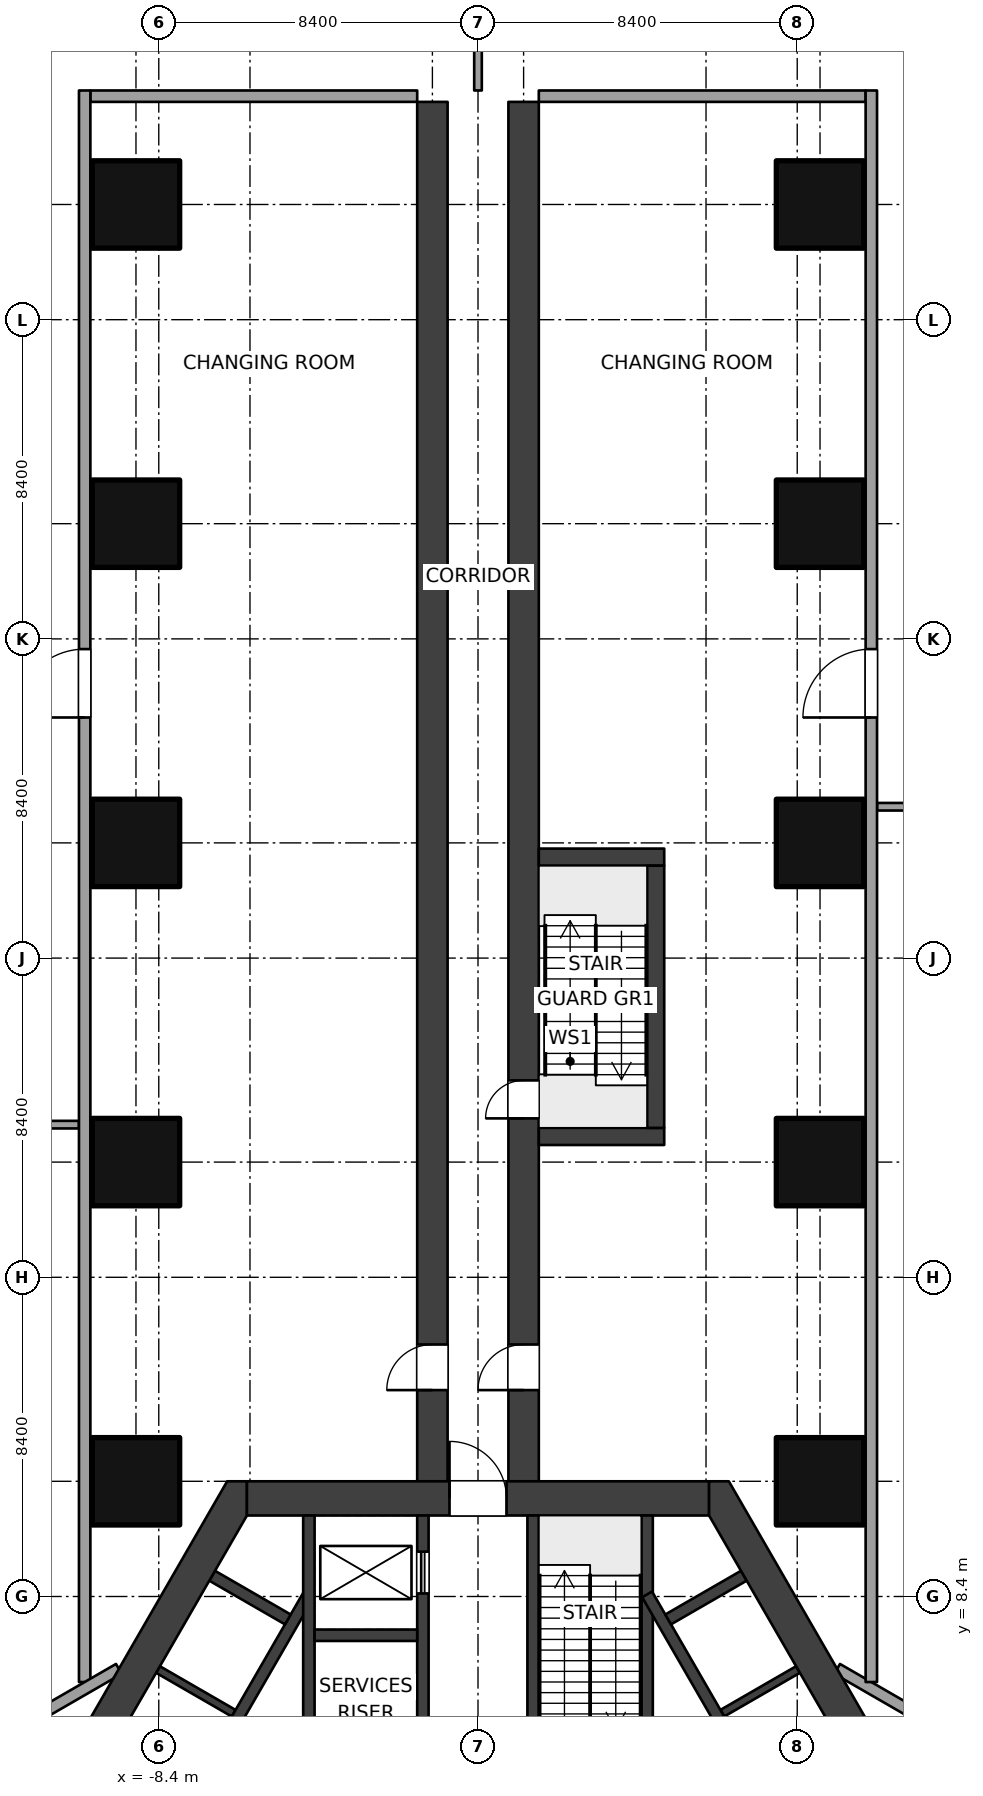
"""IFC4 building model, lengths in metres.
Left out: names, types, materials, properties, quantities, classifications, styles, units other than length and angle.
Written with IfcOpenShell. Run it as: python <this file> out.ifc"""

import sys

from ifc_helpers import new_model, si_unit, direction, frame, frame_2d, origin, origin_2d, place, context, subcontext, project, spatial, polyline, rectangle, outline, extrude, element, fill, save


model = new_model("IFC4")
c1 = context("Model", 3, precision=1e-05, world=origin(), true_north=direction((0.0, 1.0)))
c2 = subcontext(c1, "Body", "Model", "MODEL_VIEW")
j1 = project(units=[si_unit("LENGTHUNIT", "METRE"), si_unit("PLANEANGLEUNIT", "RADIAN")], contexts=[c1])
p1 = place(None, origin())
s1 = spatial("IfcSite", under=j1, at=p1, CompositionType="ELEMENT")
p2 = place(p1, origin())
s2 = spatial("IfcBuilding", under=s1, at=p2, CompositionType="ELEMENT")
p3 = place(p2, frame((0.0, 0.0, 11.0)))
s3 = spatial("IfcBuildingStorey", under=s2, at=p3, CompositionType="ELEMENT", Elevation=11.0)
for number, where, z_axis, x_axis in (
    (1, (-9.0, 11.432, 0.0), (0.0, 0.0, 1.0), (1.0, 0.0, 0.0)),
    (2, (9.0, 11.432, 0.0), (0.0, 0.0, 1.0), (1.0, 0.0, 0.0)),
    (3, (-9.0, 19.832, 0.0), (0.0, 0.0, 1.0), (1.0, 0.0, 0.0)),
    (4, (9.0, 19.832, 0.0), (0.0, 0.0, 1.0), (1.0, 0.0, 0.0)),
    (5, (-9.0, 28.231, 0.0), (0.0, 0.0, 1.0), (1.0, 0.0, 0.0)),
    (6, (9.0, 28.231, 0.0), (0.0, 0.0, 1.0), (1.0, 0.0, 0.0)),
    (7, (-9.0, 36.632, 0.0), (0.0, 0.0, 1.0), (1.0, 0.0, 0.0)),
    (8, (9.0, 36.632, 0.0), (0.0, 0.0, 1.0), (1.0, 0.0, 0.0)),
    (9, (-9.0, 45.031, 0.0), (0.0, 0.0, 1.0), (1.0, 0.0, 0.0)),
    (10, (9.0, 45.031, 0.0), (0.0, 0.0, 1.0), (1.0, 0.0, 0.0)),
):
    element("IfcColumn", number, at=place(p3, frame(where, z_axis=z_axis, x_axis=x_axis)), inside=s3, PredefinedType="COLUMN", context=c2, shape_type="SweptSolid", body=[
        extrude(rectangle(XDim=2.3, YDim=2.3, at=origin_2d()), origin(), (0.0, 0.0, 1.0), 5.0),
    ])
p4 = place(p3, frame((-6.08, 10.981, 0.0), z_axis=(0.0, 0.0, 1.0), x_axis=(1.0, 0.0, 0.0)))
e11 = element("IfcWall", 11, at=p4, inside=s3, PredefinedType="SHEAR", context=c2, shape_type="SweptSolid", body=[
    extrude(rectangle(XDim=12.161, YDim=0.9, at=frame_2d((6.08, 0.0))), origin(), (0.0, 0.0, 1.0), 5.0),
])
p5 = place(p4, frame((5.33, 0.0, 0.0)))
e12 = element("IfcOpeningElement", 12, at=p5, cuts=e11, PredefinedType="OPENING", context=c2, shape_type="SweptSolid", body=[
    extrude(rectangle(XDim=1.5, YDim=2.1, at=frame_2d((0.75, 1.05))), frame((0.0, 0.46, 0.0), z_axis=(0.0, -1.0, 0.0), x_axis=(1.0, 0.0, 0.0)), (0.0, 0.0, 1.0), 0.92),
])
p6 = place(p3, origin())
e13 = element("IfcWall", 13, at=p6, inside=s3, PredefinedType="SHEAR", context=c2, shape_type="SweptSolid", body=[
    extrude(outline(polyline([(13.2, 0.0), (6.6, 11.432), (6.08, 11.432), (6.08, 10.531), (12.161, 0.0), (12.94, -0.45), (13.2, 0.0)])), origin(), (0.0, 0.0, 1.0), 5.0),
])
p7 = place(p3, origin())
e14 = element("IfcWall", 14, at=p7, inside=s3, PredefinedType="SHEAR", context=c2, shape_type="SweptSolid", body=[
    extrude(outline(polyline([(-6.6, 11.432), (-13.2, 0.0), (-12.94, -0.45), (-12.161, 0.0), (-6.08, 10.531), (-6.08, 11.432), (-6.6, 11.432)])), origin(), (0.0, 0.0, 1.0), 5.0),
])
p8 = place(p3, frame((1.45, 3.63, 0.0), z_axis=(0.0, 0.0, 1.0), x_axis=(0.0, 1.0, 0.0)))
e15 = element("IfcWall", 15, at=p8, inside=s3, PredefinedType="SHEAR", context=c2, shape_type="SweptSolid", body=[
    extrude(rectangle(XDim=6.902, YDim=0.3, at=frame_2d((3.451, 0.0))), origin(), (0.0, 0.0, 1.0), 5.0),
])
p9 = place(p8, frame((0.25, 0.0, 0.0)))
e16 = element("IfcOpeningElement", 16, at=p9, cuts=e15, PredefinedType="OPENING", context=c2, shape_type="SweptSolid", body=[
    extrude(rectangle(XDim=1.0, YDim=2.1, at=frame_2d((0.5, 1.05))), frame((0.0, 0.16, 0.0), z_axis=(0.0, -1.0, 0.0), x_axis=(1.0, 0.0, 0.0)), (0.0, 0.0, 1.0), 0.32),
])
p10 = place(p3, frame((4.45, 3.63, 0.0), z_axis=(0.0, 0.0, 1.0), x_axis=(0.0, 1.0, 0.0)))
e17 = element("IfcWall", 17, at=p10, inside=s3, PredefinedType="SHEAR", context=c2, shape_type="SweptSolid", body=[
    extrude(rectangle(XDim=6.902, YDim=0.3, at=frame_2d((3.451, 0.0))), origin(), (0.0, 0.0, 1.0), 5.0),
])
p11 = place(p3, frame((-1.45, 3.63, 0.0), z_axis=(0.0, 0.0, 1.0), x_axis=(0.0, 1.0, 0.0)))
e18 = element("IfcWall", 18, at=p11, inside=s3, PredefinedType="SHEAR", context=c2, shape_type="SweptSolid", body=[
    extrude(rectangle(XDim=6.902, YDim=0.3, at=frame_2d((3.451, 0.0))), origin(), (0.0, 0.0, 1.0), 5.0),
])
p12 = place(p11, frame((4.85, 0.0, 0.0)))
e19 = element("IfcOpeningElement", 19, at=p12, cuts=e18, PredefinedType="OPENING", context=c2, shape_type="SweptSolid", body=[
    extrude(rectangle(XDim=1.1, YDim=2.1, at=frame_2d((0.55, 1.05))), frame((0.0, 0.16, 0.0), z_axis=(0.0, -1.0, 0.0), x_axis=(1.0, 0.0, 0.0)), (0.0, 0.0, 1.0), 0.32),
])
p13 = place(p3, frame((-4.45, 3.63, 0.0), z_axis=(0.0, 0.0, 1.0), x_axis=(0.0, 1.0, 0.0)))
e20 = element("IfcWall", 20, at=p13, inside=s3, PredefinedType="SHEAR", context=c2, shape_type="SweptSolid", body=[
    extrude(rectangle(XDim=6.902, YDim=0.3, at=frame_2d((3.451, 0.0))), origin(), (0.0, 0.0, 1.0), 5.0),
])
p14 = place(p3, frame((-4.3, 7.38, 0.0), z_axis=(0.0, 0.0, 1.0), x_axis=(1.0, 0.0, 0.0)))
e21 = element("IfcWall", 21, at=p14, inside=s3, PredefinedType="SHEAR", context=c2, shape_type="SweptSolid", body=[
    extrude(rectangle(XDim=2.7, YDim=0.3, at=frame_2d((1.35, 0.0))), origin(), (0.0, 0.0, 1.0), 5.0),
])
p15 = place(p3, frame((4.45, 8.455, 0.0), z_axis=(0.0, 0.0, 1.0), x_axis=(0.500002290144, -0.866024081565, 0.0)))
e22 = element("IfcWall", 22, at=p15, inside=s3, PredefinedType="SHEAR", context=c2, shape_type="SweptSolid", body=[
    extrude(rectangle(XDim=10.195, YDim=0.3, at=frame_2d((5.098, 0.0))), origin(), (0.0, 0.0, 1.0), 5.0),
])
p16 = place(p3, frame((5.004, 7.796, 0.0), z_axis=(0.0, 0.0, 1.0), x_axis=(0.866053019151, 0.499952165731, 0.0)))
e23 = element("IfcWall", 23, at=p16, inside=s3, PredefinedType="SHEAR", context=c2, shape_type="SweptSolid", body=[
    extrude(rectangle(XDim=2.3, YDim=0.3, at=frame_2d((1.15, 0.0))), origin(), (0.0, 0.0, 1.0), 5.0),
])
p17 = place(p3, frame((6.429, 5.328, 0.0), z_axis=(0.0, 0.0, 1.0), x_axis=(0.866007057882, 0.500031774688, 0.0)))
e24 = element("IfcWall", 24, at=p17, inside=s3, PredefinedType="SHEAR", context=c2, shape_type="SweptSolid", body=[
    extrude(rectangle(XDim=2.3, YDim=0.2, at=frame_2d((1.15, 0.0))), origin(), (0.0, 0.0, 1.0), 5.0),
])
p18 = place(p3, frame((-9.548, -0.374, 0.0), z_axis=(0.0, 0.0, 1.0), x_axis=(0.500002290144, 0.866024081565, 0.0)))
e25 = element("IfcWall", 25, at=p18, inside=s3, PredefinedType="SHEAR", context=c2, shape_type="SweptSolid", body=[
    extrude(rectangle(XDim=10.195, YDim=0.3, at=frame_2d((5.098, 0.0))), origin(), (0.0, 0.0, 1.0), 5.0),
])
p19 = place(p3, frame((-5.004, 7.796, 0.0), z_axis=(0.0, 0.0, 1.0), x_axis=(-0.866053019151, 0.499952165731, 0.0)))
e26 = element("IfcWall", 26, at=p19, inside=s3, PredefinedType="SHEAR", context=c2, shape_type="SweptSolid", body=[
    extrude(rectangle(XDim=2.3, YDim=0.3, at=frame_2d((1.15, 0.0))), origin(), (0.0, 0.0, 1.0), 5.0),
])
p20 = place(p3, frame((-6.429, 5.328, 0.0), z_axis=(0.0, 0.0, 1.0), x_axis=(-0.866007057882, 0.500031774688, 0.0)))
e27 = element("IfcWall", 27, at=p20, inside=s3, PredefinedType="SHEAR", context=c2, shape_type="SweptSolid", body=[
    extrude(rectangle(XDim=2.3, YDim=0.2, at=frame_2d((1.15, 0.0))), origin(), (0.0, 0.0, 1.0), 5.0),
])
p21 = place(p3, frame((-1.2, 10.981, 0.0), z_axis=(0.0, 0.0, 1.0), x_axis=(0.0, 1.0, 0.0)))
e28 = element("IfcWall", 28, at=p21, inside=s3, PredefinedType="SHEAR", context=c2, shape_type="SweptSolid", body=[
    extrude(rectangle(XDim=36.75, YDim=0.8, at=frame_2d((18.375, 0.0))), origin(), (0.0, 0.0, 1.0), 5.0),
])
p22 = place(p21, frame((2.85, 0.0, 0.0)))
e29 = element("IfcOpeningElement", 29, at=p22, cuts=e28, PredefinedType="OPENING", context=c2, shape_type="SweptSolid", body=[
    extrude(rectangle(XDim=1.2, YDim=2.1, at=frame_2d((0.6, 1.05))), frame((0.0, 0.41, 0.0), z_axis=(0.0, -1.0, 0.0), x_axis=(1.0, 0.0, 0.0)), (0.0, 0.0, 1.0), 0.82),
])
p23 = place(p3, frame((1.2, 10.981, 0.0), z_axis=(0.0, 0.0, 1.0), x_axis=(0.0, 1.0, 0.0)))
e30 = element("IfcWall", 30, at=p23, inside=s3, PredefinedType="SHEAR", context=c2, shape_type="SweptSolid", body=[
    extrude(rectangle(XDim=36.75, YDim=0.8, at=frame_2d((18.375, 0.0))), origin(), (0.0, 0.0, 1.0), 5.0),
])
p24 = place(p23, frame((10.0, 0.0, 0.0)))
e31 = element("IfcOpeningElement", 31, at=p24, cuts=e30, PredefinedType="OPENING", context=c2, shape_type="SweptSolid", body=[
    extrude(rectangle(XDim=1.0, YDim=2.1, at=frame_2d((0.5, 1.05))), frame((0.0, 0.41, 0.0), z_axis=(0.0, -1.0, 0.0), x_axis=(1.0, 0.0, 0.0)), (0.0, 0.0, 1.0), 0.82),
])
p25 = place(p23, frame((2.85, 0.0, 0.0)))
e32 = element("IfcOpeningElement", 32, at=p25, cuts=e30, PredefinedType="OPENING", context=c2, shape_type="SweptSolid", body=[
    extrude(rectangle(XDim=1.2, YDim=2.1, at=frame_2d((0.6, 1.05))), frame((0.0, 0.41, 0.0), z_axis=(0.0, -1.0, 0.0), x_axis=(1.0, 0.0, 0.0)), (0.0, 0.0, 1.0), 0.82),
])
p26 = place(p3, frame((0.0, 48.031, 0.0), z_axis=(0.0, 0.0, 1.0), x_axis=(0.0, 1.0, 0.0)))
e33 = element("IfcWall", 33, at=p26, inside=s3, PredefinedType="SOLIDWALL", context=c2, shape_type="SweptSolid", body=[
    extrude(rectangle(XDim=2.176, YDim=0.2, at=frame_2d((1.088, 0.0))), origin(), (0.0, 0.0, 1.0), 4.7),
])
p27 = place(p3, frame((10.5, 29.183, 0.0), z_axis=(0.0, 0.0, 1.0), x_axis=(1.0, 0.0, 0.0)))
e34 = element("IfcWall", 34, at=p27, inside=s3, PredefinedType="SOLIDWALL", context=c2, shape_type="SweptSolid", body=[
    extrude(rectangle(XDim=39.737, YDim=0.2, at=frame_2d((19.869, 0.0))), origin(), (0.0, 0.0, 1.0), 4.7),
])
p28 = place(p27, frame((18.0, 0.0, 0.0)))
e35 = element("IfcOpeningElement", 35, at=p28, cuts=e34, PredefinedType="OPENING", context=c2, shape_type="SweptSolid", body=[
    extrude(rectangle(XDim=1.8, YDim=2.4, at=frame_2d((0.9, 1.2))), frame((0.0, 0.11, 0.0), z_axis=(0.0, -1.0, 0.0), x_axis=(1.0, 0.0, 0.0)), (0.0, 0.0, 1.0), 0.22),
])
p29 = place(p3, frame((-50.237, 20.817, 0.0), z_axis=(0.0, 0.0, 1.0), x_axis=(1.0, 0.0, 0.0)))
e36 = element("IfcWall", 36, at=p29, inside=s3, PredefinedType="SOLIDWALL", context=c2, shape_type="SweptSolid", body=[
    extrude(rectangle(XDim=39.737, YDim=0.2, at=frame_2d((19.869, 0.0))), origin(), (0.0, 0.0, 1.0), 4.7),
])
p30 = place(p29, frame((19.937, 0.0, 0.0)))
e37 = element("IfcOpeningElement", 37, at=p30, cuts=e36, PredefinedType="OPENING", context=c2, shape_type="SweptSolid", body=[
    extrude(rectangle(XDim=1.8, YDim=2.4, at=frame_2d((0.9, 1.2))), frame((0.0, 0.11, 0.0), z_axis=(0.0, -1.0, 0.0), x_axis=(1.0, 0.0, 0.0)), (0.0, 0.0, 1.0), 0.22),
])
for number, where, z_axis, x_axis in (
    (38, (-1.6, 47.882, 0.0), (0.0, 0.0, 1.0), (-1.0, 0.0, 0.0)),
    (39, (1.6, 47.882, 0.0), (0.0, 0.0, 1.0), (1.0, 0.0, 0.0)),
):
    element("IfcWall", number, at=place(p3, frame(where, z_axis=z_axis, x_axis=x_axis)), inside=s3, PredefinedType="SOLIDWALL", context=c2, shape_type="SweptSolid", body=[
        extrude(rectangle(XDim=8.6, YDim=0.3, at=frame_2d((4.3, 0.0))), origin(), (0.0, 0.0, 1.0), 3.1),
    ])
p31 = place(p3, frame((-10.35, 6.149, 0.0), z_axis=(0.0, 0.0, 1.0), x_axis=(0.0, 1.0, 0.0)))
e40 = element("IfcWall", 40, at=p31, inside=s3, PredefinedType="SOLIDWALL", context=c2, shape_type="SweptSolid", body=[
    extrude(rectangle(XDim=41.883, YDim=0.3, at=frame_2d((20.941, 0.0))), origin(), (0.0, 0.0, 1.0), 4.7),
])
p32 = place(p31, frame((25.383, 0.0, 0.0)))
e41 = element("IfcOpeningElement", 41, at=p32, cuts=e40, PredefinedType="OPENING", context=c2, shape_type="SweptSolid", body=[
    extrude(rectangle(XDim=1.8, YDim=2.4, at=frame_2d((0.9, 1.2))), frame((0.0, 0.16, 0.0), z_axis=(0.0, -1.0, 0.0), x_axis=(1.0, 0.0, 0.0)), (0.0, 0.0, 1.0), 0.32),
])
p33 = place(p3, frame((10.35, 6.149, 0.0), z_axis=(0.0, 0.0, 1.0), x_axis=(0.0, 1.0, 0.0)))
e42 = element("IfcWall", 42, at=p33, inside=s3, PredefinedType="SOLIDWALL", context=c2, shape_type="SweptSolid", body=[
    extrude(rectangle(XDim=41.883, YDim=0.3, at=frame_2d((20.941, 0.0))), origin(), (0.0, 0.0, 1.0), 4.7),
])
p34 = place(p33, frame((25.383, 0.0, 0.0)))
e43 = element("IfcOpeningElement", 43, at=p34, cuts=e42, PredefinedType="OPENING", context=c2, shape_type="SweptSolid", body=[
    extrude(rectangle(XDim=1.8, YDim=2.4, at=frame_2d((0.9, 1.2))), frame((0.0, 0.16, 0.0), z_axis=(0.0, -1.0, 0.0), x_axis=(1.0, 0.0, 0.0)), (0.0, 0.0, 1.0), 0.32),
])
p35 = place(p3, frame((-9.45, 6.495, 0.0), z_axis=(0.0, 0.0, 1.0), x_axis=(-0.866025301493, -0.500000177174, 0.0)))
e44 = element("IfcWall", 44, at=p35, inside=s3, PredefinedType="SOLIDWALL", context=c2, shape_type="SweptSolid", body=[
    extrude(rectangle(XDim=43.095, YDim=0.3, at=frame_2d((21.548, 0.0))), origin(), (0.0, 0.0, 1.0), 4.7),
])
p36 = place(p35, frame((26.595, 0.0, 0.0)))
e45 = element("IfcOpeningElement", 45, at=p36, cuts=e44, PredefinedType="OPENING", context=c2, shape_type="SweptSolid", body=[
    extrude(rectangle(XDim=1.8, YDim=2.4, at=frame_2d((0.9, 1.2))), frame((0.0, 0.16, 0.0), z_axis=(0.0, -1.0, 0.0), x_axis=(1.0, 0.0, 0.0)), (0.0, 0.0, 1.0), 0.32),
])
p37 = place(p3, frame((9.45, 6.495, 0.0), z_axis=(0.0, 0.0, 1.0), x_axis=(0.866025301493, -0.500000177174, 0.0)))
e46 = element("IfcWall", 46, at=p37, inside=s3, PredefinedType="SOLIDWALL", context=c2, shape_type="SweptSolid", body=[
    extrude(rectangle(XDim=43.095, YDim=0.3, at=frame_2d((21.548, 0.0))), origin(), (0.0, 0.0, 1.0), 4.7),
])
p38 = place(p37, frame((26.595, 0.0, 0.0)))
e47 = element("IfcOpeningElement", 47, at=p38, cuts=e46, PredefinedType="OPENING", context=c2, shape_type="SweptSolid", body=[
    extrude(rectangle(XDim=1.8, YDim=2.4, at=frame_2d((0.9, 1.2))), frame((0.0, 0.16, 0.0), z_axis=(0.0, -1.0, 0.0), x_axis=(1.0, 0.0, 0.0)), (0.0, 0.0, 1.0), 0.32),
])
for number, where, z_axis, x_axis in (
    (48, (1.6, 20.507, 0.0), (0.0, 0.0, 1.0), (1.0, 0.0, 0.0)),
    (49, (1.6, 27.856, 0.0), (0.0, 0.0, 1.0), (1.0, 0.0, 0.0)),
):
    element("IfcWall", number, at=place(p3, frame(where, z_axis=z_axis, x_axis=x_axis)), inside=s3, PredefinedType="SOLIDWALL", context=c2, shape_type="SweptSolid", body=[
        extrude(rectangle(XDim=3.3, YDim=0.45, at=frame_2d((1.65, 0.0))), origin(), (0.0, 0.0, 1.0), 5.0),
    ])
p39 = place(p3, frame((4.675, 20.731, 0.0), z_axis=(0.0, 0.0, 1.0), x_axis=(0.0, 1.0, 0.0)))
e50 = element("IfcWall", 50, at=p39, inside=s3, PredefinedType="SOLIDWALL", context=c2, shape_type="SweptSolid", body=[
    extrude(rectangle(XDim=6.9, YDim=0.45, at=frame_2d((3.45, 0.0))), origin(), (0.0, 0.0, 1.0), 5.0),
])
p40 = place(p12, origin())
e51 = element("IfcDoor", 51, at=p40, inside=s3, OperationType="DOUBLE_DOOR_SLIDING", PredefinedType="DOOR", context=c2, shape_type="SweptSolid", body=[
    extrude(rectangle(XDim=1.1, YDim=2.1, at=frame_2d((0.55, 1.05))), frame((0.0, 0.025, 0.0), z_axis=(0.0, -1.0, 0.0), x_axis=(1.0, 0.0, 0.0)), (0.0, 0.0, 1.0), 0.05),
])
fill(e19, e51)
p41 = place(p5, origin())
e52 = element("IfcDoor", 52, at=p41, inside=s3, OperationType="DOUBLE_DOOR_DOUBLE_SWING", PredefinedType="DOOR", context=c2, shape_type="SweptSolid", body=[
    extrude(rectangle(XDim=1.5, YDim=2.1, at=frame_2d((0.75, 1.05))), frame((0.0, 0.025, 0.0), z_axis=(0.0, -1.0, 0.0), x_axis=(1.0, 0.0, 0.0)), (0.0, 0.0, 1.0), 0.05),
])
fill(e12, e52)
p42 = place(p24, origin())
e53 = element("IfcDoor", 53, at=p42, inside=s3, OperationType="SINGLE_SWING_LEFT", PredefinedType="DOOR", context=c2, shape_type="SweptSolid", body=[
    extrude(rectangle(XDim=1.0, YDim=2.1, at=frame_2d((0.5, 1.05))), frame((0.0, 0.025, 0.0), z_axis=(0.0, -1.0, 0.0), x_axis=(1.0, 0.0, 0.0)), (0.0, 0.0, 1.0), 0.05),
])
fill(e31, e53)
p43 = place(p22, origin())
e54 = element("IfcDoor", 54, at=p43, inside=s3, OperationType="DOUBLE_SWING_LEFT", PredefinedType="DOOR", context=c2, shape_type="SweptSolid", body=[
    extrude(rectangle(XDim=1.2, YDim=2.1, at=frame_2d((0.6, 1.05))), frame((0.0, 0.025, 0.0), z_axis=(0.0, -1.0, 0.0), x_axis=(1.0, 0.0, 0.0)), (0.0, 0.0, 1.0), 0.05),
])
fill(e29, e54)
p44 = place(p25, origin())
e55 = element("IfcDoor", 55, at=p44, inside=s3, OperationType="DOUBLE_SWING_LEFT", PredefinedType="DOOR", context=c2, shape_type="SweptSolid", body=[
    extrude(rectangle(XDim=1.2, YDim=2.1, at=frame_2d((0.6, 1.05))), frame((0.0, 0.025, 0.0), z_axis=(0.0, -1.0, 0.0), x_axis=(1.0, 0.0, 0.0)), (0.0, 0.0, 1.0), 0.05),
])
fill(e32, e55)
p45 = place(p32, origin())
e56 = element("IfcDoor", 56, at=p45, inside=s3, OperationType="DOUBLE_DOOR_DOUBLE_SWING", PredefinedType="DOOR", context=c2, shape_type="SweptSolid", body=[
    extrude(rectangle(XDim=1.8, YDim=2.4, at=frame_2d((0.9, 1.2))), frame((0.0, 0.025, 0.0), z_axis=(0.0, -1.0, 0.0), x_axis=(1.0, 0.0, 0.0)), (0.0, 0.0, 1.0), 0.05),
])
fill(e41, e56)
p46 = place(p34, origin())
e57 = element("IfcDoor", 57, at=p46, inside=s3, OperationType="DOUBLE_DOOR_DOUBLE_SWING", PredefinedType="DOOR", context=c2, shape_type="SweptSolid", body=[
    extrude(rectangle(XDim=1.8, YDim=2.4, at=frame_2d((0.9, 1.2))), frame((0.0, 0.025, 0.0), z_axis=(0.0, -1.0, 0.0), x_axis=(1.0, 0.0, 0.0)), (0.0, 0.0, 1.0), 0.05),
])
fill(e43, e57)
save(model, sys.argv[1])
